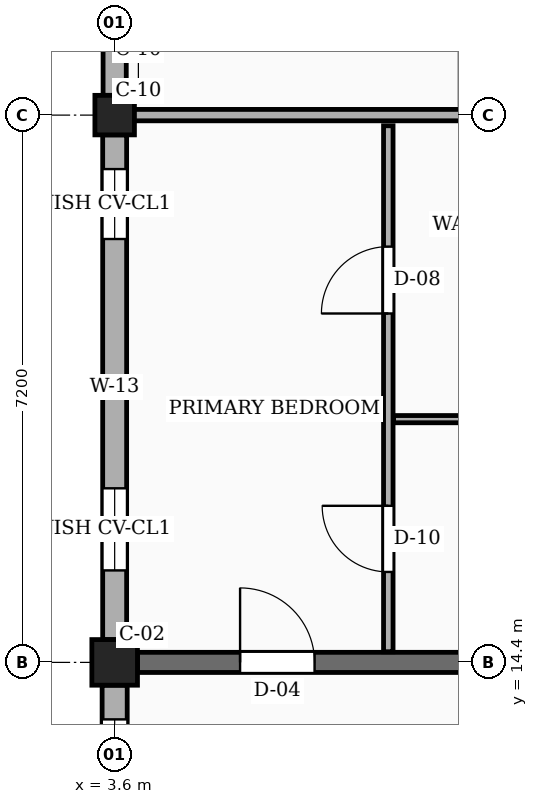
"""IFC4 building model, lengths in metres.
Left out: names, types, materials, properties, quantities, classifications, styles, units other than length and angle.
Written with IfcOpenShell. Run it as: python <this file> out.ifc"""

import sys

from ifc_helpers import new_model, si_unit, direction, frame, frame_2d, origin, origin_2d, place, context, subcontext, project, spatial, rectangle, circle, extrude, element, fill, save


model = new_model("IFC4")
c1 = context("Model", 3, precision=1e-05, world=origin(), true_north=direction((0.0, 1.0)))
c2 = subcontext(c1, "Body", "Model", "MODEL_VIEW")
j1 = project(units=[si_unit("LENGTHUNIT", "METRE"), si_unit("PLANEANGLEUNIT", "RADIAN")], contexts=[c1])
p1 = place(None, origin())
s1 = spatial("IfcSite", under=j1, at=p1, CompositionType="ELEMENT")
p2 = place(p1, origin())
s2 = spatial("IfcBuilding", under=s1, at=p2, CompositionType="ELEMENT")
p3 = place(p2, origin())
s3 = spatial("IfcBuildingStorey", under=s2, at=p3, CompositionType="ELEMENT", Elevation=0.0)
p4 = place(p3, frame((3.6, 14.4, 0.0), z_axis=(0.0, 0.0, 1.0), x_axis=(1.0, 0.0, 0.0)))
e1 = element("IfcColumn", 1, at=p4, inside=s3, PredefinedType="COLUMN", context=c2, shape_type="SweptSolid", body=[
    extrude(rectangle(XDim=0.6, YDim=0.6, at=origin_2d()), origin(), (0.0, 0.0, 1.0), 4.5),
])
p5 = place(p3, frame((3.6, 21.6, 0.0), z_axis=(0.0, 0.0, 1.0), x_axis=(1.0, 0.0, 0.0)))
e2 = element("IfcColumn", 2, at=p5, inside=s3, PredefinedType="COLUMN", context=c2, shape_type="SweptSolid", body=[
    extrude(circle(Radius=0.26, at=origin_2d()), origin(), (0.0, 0.0, 1.0), 4.5),
])
p6 = place(p3, frame((3.9, 14.4, 0.0), z_axis=(0.0, 0.0, 1.0), x_axis=(1.0, 0.0, 0.0)))
e3 = element("IfcWall", 3, at=p6, inside=s3, PredefinedType="SOLIDWALL", context=c2, shape_type="SweptSolid", body=[
    extrude(rectangle(XDim=6.575, YDim=0.265, at=frame_2d((3.288, 0.0))), origin(), (0.0, 0.0, 1.0), 3.52),
])
p7 = place(p6, frame((1.35, 0.0, 0.0)))
e4 = element("IfcOpeningElement", 4, at=p7, cuts=e3, PredefinedType="OPENING", context=c2, shape_type="SweptSolid", body=[
    extrude(rectangle(XDim=0.98, YDim=2.12, at=frame_2d((0.49, 1.06))), frame((0.0, 0.143, 0.0), z_axis=(0.0, -1.0, 0.0), x_axis=(1.0, 0.0, 0.0)), (0.0, 0.0, 1.0), 0.285),
])
p8 = place(p3, frame((3.6, 28.5, 0.0), z_axis=(0.0, 0.0, 1.0), x_axis=(0.0, -1.0, 0.0)))
e5 = element("IfcWall", 5, at=p8, inside=s3, PredefinedType="SOLIDWALL", context=c2, shape_type="SweptSolid", body=[
    extrude(rectangle(XDim=6.64, YDim=0.305, at=frame_2d((3.32, 0.0))), origin(), (0.0, 0.0, 1.0), 3.79),
])
p9 = place(p8, frame((0.45, 0.0, 0.78)))
e6 = element("IfcOpeningElement", 6, at=p9, cuts=e5, PredefinedType="OPENING", context=c2, shape_type="SweptSolid", body=[
    extrude(rectangle(XDim=1.45, YDim=1.44, at=frame_2d((0.725, 0.72))), frame((0.0, 0.163, 0.0), z_axis=(0.0, -1.0, 0.0), x_axis=(1.0, 0.0, 0.0)), (0.0, 0.0, 1.0), 0.325),
])
p10 = place(p8, frame((4.65, 0.0, 0.78)))
e7 = element("IfcOpeningElement", 7, at=p10, cuts=e5, PredefinedType="OPENING", context=c2, shape_type="SweptSolid", body=[
    extrude(rectangle(XDim=0.92, YDim=1.15, at=frame_2d((0.46, 0.575))), frame((0.0, 0.163, 0.0), z_axis=(0.0, -1.0, 0.0), x_axis=(1.0, 0.0, 0.0)), (0.0, 0.0, 1.0), 0.325),
])
p11 = place(p3, frame((3.6, 21.34, 0.0), z_axis=(0.0, 0.0, 1.0), x_axis=(0.0, -1.0, 0.0)))
e8 = element("IfcWall", 8, at=p11, inside=s3, PredefinedType="SOLIDWALL", context=c2, shape_type="SweptSolid", body=[
    extrude(rectangle(XDim=6.64, YDim=0.315, at=frame_2d((3.32, 0.0))), origin(), (0.0, 0.0, 1.0), 3.79),
])
p12 = place(p11, frame((0.45, 0.0, 0.78)))
e9 = element("IfcOpeningElement", 9, at=p12, cuts=e8, PredefinedType="OPENING", context=c2, shape_type="SweptSolid", body=[
    extrude(rectangle(XDim=0.92, YDim=1.15, at=frame_2d((0.46, 0.575))), frame((0.0, 0.167, 0.0), z_axis=(0.0, -1.0, 0.0), x_axis=(1.0, 0.0, 0.0)), (0.0, 0.0, 1.0), 0.335),
])
p13 = place(p11, frame((4.65, 0.0, 0.78)))
e10 = element("IfcOpeningElement", 10, at=p13, cuts=e8, PredefinedType="OPENING", context=c2, shape_type="SweptSolid", body=[
    extrude(rectangle(XDim=1.08, YDim=1.15, at=frame_2d((0.54, 0.575))), frame((0.0, 0.167, 0.0), z_axis=(0.0, -1.0, 0.0), x_axis=(1.0, 0.0, 0.0)), (0.0, 0.0, 1.0), 0.335),
])
p14 = place(p3, frame((3.6, 14.1, 0.0), z_axis=(0.0, 0.0, 1.0), x_axis=(0.0, -1.0, 0.0)))
e11 = element("IfcWall", 11, at=p14, inside=s3, PredefinedType="SOLIDWALL", context=c2, shape_type="SweptSolid", body=[
    extrude(rectangle(XDim=6.6, YDim=0.33, at=frame_2d((3.3, 0.0))), origin(), (0.0, 0.0, 1.0), 3.79),
])
p15 = place(p14, frame((0.45, 0.0, 0.78)))
e12 = element("IfcOpeningElement", 12, at=p15, cuts=e11, PredefinedType="OPENING", context=c2, shape_type="SweptSolid", body=[
    extrude(rectangle(XDim=1.08, YDim=1.15, at=frame_2d((0.54, 0.575))), frame((0.0, 0.175, 0.0), z_axis=(0.0, -1.0, 0.0), x_axis=(1.0, 0.0, 0.0)), (0.0, 0.0, 1.0), 0.35),
])
p16 = place(p14, frame((4.65, 0.0, 0.78)))
e13 = element("IfcOpeningElement", 13, at=p16, cuts=e11, PredefinedType="OPENING", context=c2, shape_type="SweptSolid", body=[
    extrude(rectangle(XDim=1.24, YDim=1.15, at=frame_2d((0.62, 0.575))), frame((0.0, 0.175, 0.0), z_axis=(0.0, -1.0, 0.0), x_axis=(1.0, 0.0, 0.0)), (0.0, 0.0, 1.0), 0.35),
])
p17 = place(p3, frame((3.775, 21.6, 0.0), z_axis=(0.0, 0.0, 1.0), x_axis=(1.0, 0.0, 0.0)))
e14 = element("IfcWall", 14, at=p17, inside=s3, PredefinedType="PARTITIONING", context=c2, shape_type="SweptSolid", body=[
    extrude(rectangle(XDim=6.885, YDim=0.15, at=frame_2d((3.442, 0.0))), origin(), (0.0, 0.0, 1.0), 3.27),
])
p18 = place(p3, frame((7.2, 14.54, 0.0), z_axis=(0.0, 0.0, 1.0), x_axis=(0.0, 1.0, 0.0)))
e15 = element("IfcWall", 15, at=p18, inside=s3, PredefinedType="PARTITIONING", context=c2, shape_type="SweptSolid", body=[
    extrude(rectangle(XDim=6.92, YDim=0.125, at=frame_2d((3.46, 0.0))), origin(), (0.0, 0.0, 1.0), 3.655),
])
p19 = place(p18, frame((1.05, 0.0, 0.0)))
e16 = element("IfcOpeningElement", 16, at=p19, cuts=e15, PredefinedType="OPENING", context=c2, shape_type="SweptSolid", body=[
    extrude(rectangle(XDim=0.87, YDim=2.05, at=frame_2d((0.435, 1.025))), frame((0.0, 0.073, 0.0), z_axis=(0.0, -1.0, 0.0), x_axis=(1.0, 0.0, 0.0)), (0.0, 0.0, 1.0), 0.145),
])
p20 = place(p18, frame((4.45, 0.0, 0.0)))
e17 = element("IfcOpeningElement", 17, at=p20, cuts=e15, PredefinedType="OPENING", context=c2, shape_type="SweptSolid", body=[
    extrude(rectangle(XDim=0.88, YDim=2.08, at=frame_2d((0.44, 1.04))), frame((0.0, 0.073, 0.0), z_axis=(0.0, -1.0, 0.0), x_axis=(1.0, 0.0, 0.0)), (0.0, 0.0, 1.0), 0.145),
])
p21 = place(p3, frame((7.27, 17.6, 0.0), z_axis=(0.0, 0.0, 1.0), x_axis=(1.0, 0.0, 0.0)))
e18 = element("IfcWall", 18, at=p21, inside=s3, PredefinedType="PARTITIONING", context=c2, shape_type="SweptSolid", body=[
    extrude(rectangle(XDim=3.39, YDim=0.095, at=frame_2d((1.695, 0.0))), origin(), (0.0, 0.0, 1.0), 3.655),
])
p22 = place(p12, origin())
e19 = element("IfcWindow", 19, at=p22, inside=s3, PartitioningType="SINGLE_PANEL", PredefinedType="WINDOW", context=c2, shape_type="SweptSolid", body=[
    extrude(rectangle(XDim=0.92, YDim=1.15, at=frame_2d((0.46, 0.575))), frame((0.0, 0.03, 0.0), z_axis=(0.0, -1.0, 0.0), x_axis=(1.0, 0.0, 0.0)), (0.0, 0.0, 1.0), 0.06),
])
fill(e9, e19)
p23 = place(p13, origin())
e20 = element("IfcWindow", 20, at=p23, inside=s3, PartitioningType="SINGLE_PANEL", PredefinedType="WINDOW", context=c2, shape_type="SweptSolid", body=[
    extrude(rectangle(XDim=1.08, YDim=1.15, at=frame_2d((0.54, 0.575))), frame((0.0, 0.03, 0.0), z_axis=(0.0, -1.0, 0.0), x_axis=(1.0, 0.0, 0.0)), (0.0, 0.0, 1.0), 0.06),
])
fill(e10, e20)
p24 = place(p15, origin())
e21 = element("IfcWindow", 21, at=p24, inside=s3, PartitioningType="SINGLE_PANEL", PredefinedType="WINDOW", context=c2, shape_type="SweptSolid", body=[
    extrude(rectangle(XDim=1.08, YDim=1.15, at=frame_2d((0.54, 0.575))), frame((0.0, 0.03, 0.0), z_axis=(0.0, -1.0, 0.0), x_axis=(1.0, 0.0, 0.0)), (0.0, 0.0, 1.0), 0.06),
])
fill(e12, e21)
p25 = place(p19, origin())
e22 = element("IfcDoor", 22, at=p25, inside=s3, OperationType="SINGLE_SWING_RIGHT", PredefinedType="DOOR", context=c2, shape_type="SweptSolid", body=[
    extrude(rectangle(XDim=0.87, YDim=2.05, at=frame_2d((0.435, 1.025))), frame((0.0, 0.025, 0.0), z_axis=(0.0, -1.0, 0.0), x_axis=(1.0, 0.0, 0.0)), (0.0, 0.0, 1.0), 0.05),
])
fill(e16, e22)
p26 = place(p20, origin())
e23 = element("IfcDoor", 23, at=p26, inside=s3, OperationType="SINGLE_SWING_LEFT", PredefinedType="DOOR", context=c2, shape_type="SweptSolid", body=[
    extrude(rectangle(XDim=0.88, YDim=2.08, at=frame_2d((0.44, 1.04))), frame((0.0, 0.025, 0.0), z_axis=(0.0, -1.0, 0.0), x_axis=(1.0, 0.0, 0.0)), (0.0, 0.0, 1.0), 0.05),
])
fill(e17, e23)
p27 = place(p7, origin())
e24 = element("IfcDoor", 24, at=p27, inside=s3, OperationType="SINGLE_SWING_LEFT", PredefinedType="DOOR", context=c2, shape_type="SweptSolid", body=[
    extrude(rectangle(XDim=0.98, YDim=2.12, at=frame_2d((0.49, 1.06))), frame((0.0, 0.025, 0.0), z_axis=(0.0, -1.0, 0.0), x_axis=(1.0, 0.0, 0.0)), (0.0, 0.0, 1.0), 0.05),
])
fill(e4, e24)
save(model, sys.argv[1])
